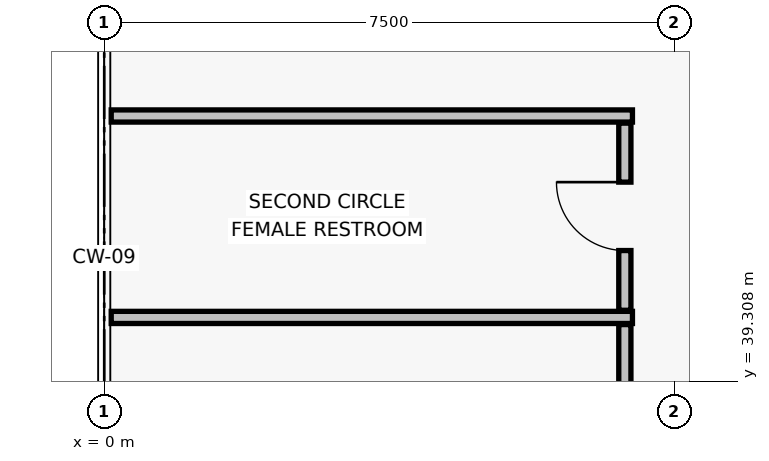
"""IFC4 building model, lengths in metres.
Left out: names, types, materials, properties, quantities, classifications, styles, units other than length and angle.
Written with IfcOpenShell. Run it as: python <this file> out.ifc"""

import sys

from ifc_helpers import new_model, si_unit, direction, frame, frame_2d, origin, place, context, subcontext, project, spatial, rectangle, extrude, element, fill, save


model = new_model("IFC4")
c1 = context("Model", 3, precision=1e-05, world=origin(), true_north=direction((0.0, 1.0)))
c2 = subcontext(c1, "Body", "Model", "MODEL_VIEW")
j1 = project(units=[si_unit("LENGTHUNIT", "METRE"), si_unit("PLANEANGLEUNIT", "RADIAN")], contexts=[c1])
p1 = place(None, origin())
s1 = spatial("IfcSite", under=j1, at=p1, CompositionType="ELEMENT")
p2 = place(p1, origin())
s2 = spatial("IfcBuilding", under=s1, at=p2, CompositionType="ELEMENT")
p3 = place(p2, frame((0.0, 0.0, 13.2)))
s3 = spatial("IfcBuildingStorey", under=s2, at=p3, CompositionType="ELEMENT", Elevation=13.2)
for number, where, z_axis, x_axis in (
    (1, (0.092, 40.15, 0.0), (0.0, 0.0, 1.0), (1.0, 0.0, 0.0)),
    (2, (0.092, 42.8, 0.0), (0.0, 0.0, 1.0), (1.0, 0.0, 0.0)),
):
    element("IfcWall", number, at=place(p3, frame(where, z_axis=z_axis, x_axis=x_axis)), inside=s3, PredefinedType="PARTITIONING", context=c2, shape_type="SweptSolid", body=[
        extrude(rectangle(XDim=6.858, YDim=0.16, at=frame_2d((3.429, 0.0))), origin(), (0.0, 0.0, 1.0), 2.97),
    ])
p4 = place(p3, frame((6.85, 37.594, 0.0), z_axis=(0.0, 0.0, 1.0), x_axis=(0.0, 1.0, 0.0)))
e3 = element("IfcWall", 3, at=p4, inside=s3, PredefinedType="PARTITIONING", context=c2, shape_type="SweptSolid", body=[
    extrude(rectangle(XDim=2.462, YDim=0.16, at=frame_2d((1.231, 0.0))), origin(), (0.0, 0.0, 1.0), 2.59),
])
p5 = place(p4, frame((0.776, 0.0, 0.0)))
e4 = element("IfcOpeningElement", 4, at=p5, cuts=e3, PredefinedType="OPENING", context=c2, shape_type="SweptSolid", body=[
    extrude(rectangle(XDim=0.9, YDim=2.1, at=frame_2d((0.45, 1.05))), frame((0.0, 0.09, 0.0), z_axis=(0.0, -1.0, 0.0), x_axis=(1.0, 0.0, 0.0)), (0.0, 0.0, 1.0), 0.18),
])
p6 = place(p3, frame((6.85, 40.244, 0.0), z_axis=(0.0, 0.0, 1.0), x_axis=(0.0, 1.0, 0.0)))
e5 = element("IfcWall", 5, at=p6, inside=s3, PredefinedType="PARTITIONING", context=c2, shape_type="SweptSolid", body=[
    extrude(rectangle(XDim=2.462, YDim=0.16, at=frame_2d((1.231, 0.0))), origin(), (0.0, 0.0, 1.0), 2.97),
])
p7 = place(p6, frame((0.786, 0.0, 0.0)))
e6 = element("IfcOpeningElement", 6, at=p7, cuts=e5, PredefinedType="OPENING", context=c2, shape_type="SweptSolid", body=[
    extrude(rectangle(XDim=0.9, YDim=2.1, at=frame_2d((0.45, 1.05))), frame((0.0, 0.09, 0.0), z_axis=(0.0, -1.0, 0.0), x_axis=(1.0, 0.0, 0.0)), (0.0, 0.0, 1.0), 0.18),
])
p8 = place(p7, origin())
e7 = element("IfcDoor", 7, at=p8, inside=s3, OperationType="SINGLE_SWING_RIGHT", PredefinedType="DOOR", context=c2, shape_type="SweptSolid", body=[
    extrude(rectangle(XDim=0.9, YDim=2.1, at=frame_2d((0.45, 1.05))), frame((0.0, 0.025, 0.0), z_axis=(0.0, -1.0, 0.0), x_axis=(1.0, 0.0, 0.0)), (0.0, 0.0, 1.0), 0.05),
])
fill(e6, e7)
save(model, sys.argv[1])
